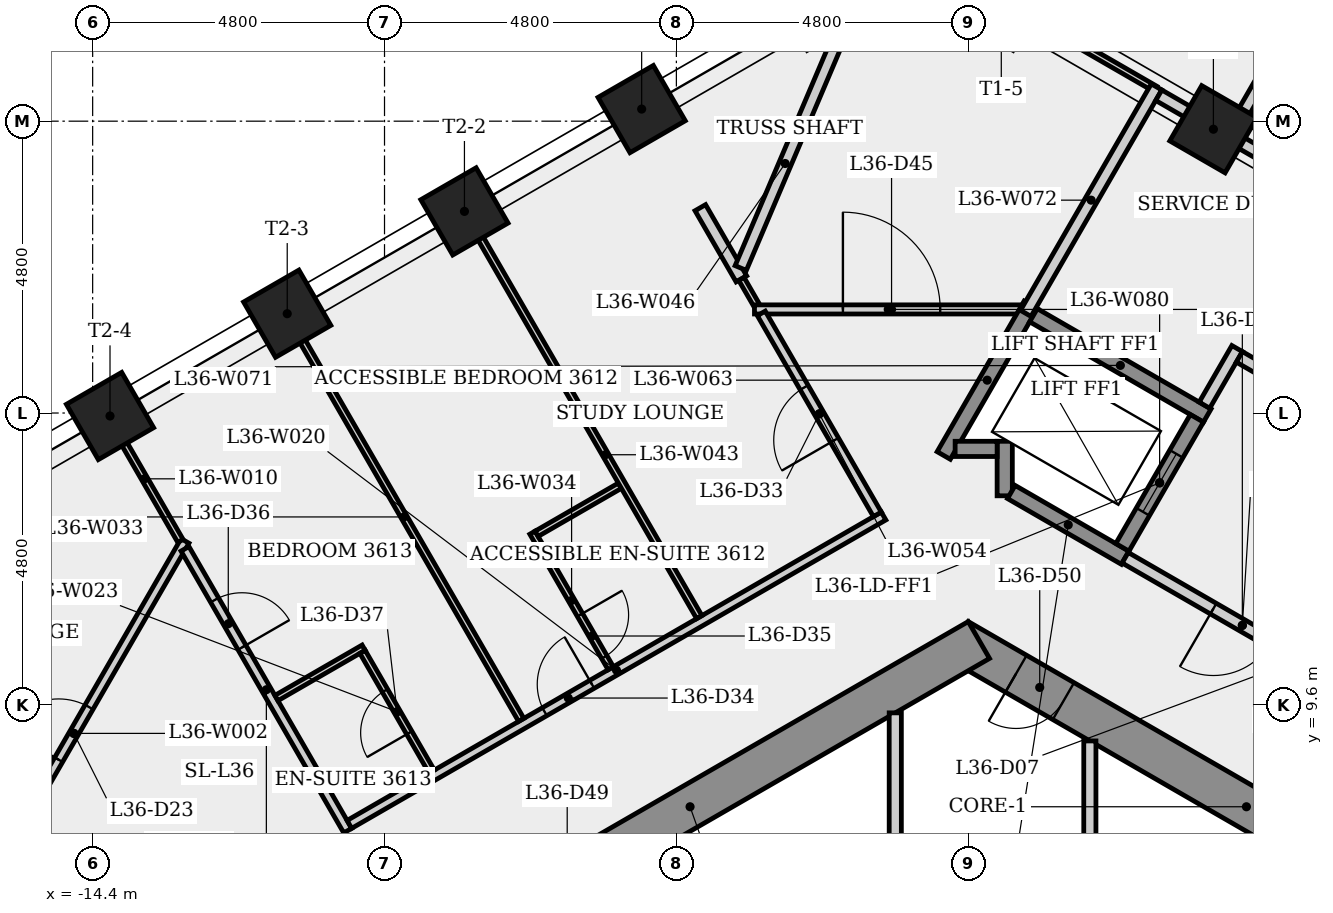
"""IFC4 building model, lengths in metres.
Left out: names, types, materials, properties, quantities, classifications, styles, units other than length and angle.
Written with IfcOpenShell. Run it as: python <this file> out.ifc"""

import sys

from ifc_helpers import new_model, si_unit, direction, frame, frame_2d, origin, origin_2d, place, context, subcontext, project, spatial, rectangle, extrude, element, fill, save


model = new_model("IFC4")
c1 = context("Model", 3, precision=1e-05, world=origin(), true_north=direction((0.0, 1.0)))
c2 = subcontext(c1, "Body", "Model", "MODEL_VIEW")
j1 = project(units=[si_unit("LENGTHUNIT", "METRE"), si_unit("PLANEANGLEUNIT", "RADIAN")], contexts=[c1])
p1 = place(None, origin())
s1 = spatial("IfcSite", under=j1, at=p1, CompositionType="ELEMENT")
p2 = place(p1, origin())
s2 = spatial("IfcBuilding", under=s1, at=p2, CompositionType="ELEMENT")
p3 = place(p2, frame((0.0, 0.0, 135.9)))
s3 = spatial("IfcBuildingStorey", under=s2, at=p3, CompositionType="ELEMENT", Elevation=135.9)
p4 = place(p3, frame((9.325, 5.182, 0.0), z_axis=(0.0, 0.0, 1.0), x_axis=(-0.866023993627, 0.500002442456, 0.0)))
e1 = element("IfcWall", 1, at=p4, inside=s3, PredefinedType="SHEAR", context=c2, shape_type="SweptSolid", body=[
    extrude(rectangle(XDim=10.97, YDim=0.7, at=frame_2d((5.485, 0.0))), origin(), (0.0, 0.0, 1.0), 4.0),
])
p5 = place(p4, frame((8.96, 0.0, 0.0)))
e2 = element("IfcOpeningElement", 2, at=p5, cuts=e1, PredefinedType="OPENING", context=c2, shape_type="SweptSolid", body=[
    extrude(rectangle(XDim=0.9, YDim=2.1, at=frame_2d((0.45, 1.05))), frame((0.0, 0.36, 0.0), z_axis=(0.0, -1.0, 0.0), x_axis=(1.0, 0.0, 0.0)), (0.0, 0.0, 1.0), 0.72),
])
p6 = place(p4, frame((2.24, 0.0, 0.0)))
e3 = element("IfcOpeningElement", 3, at=p6, cuts=e1, PredefinedType="OPENING", context=c2, shape_type="SweptSolid", body=[
    extrude(rectangle(XDim=0.9, YDim=2.1, at=frame_2d((0.45, 1.05))), frame((0.0, 0.36, 0.0), z_axis=(0.0, -1.0, 0.0), x_axis=(1.0, 0.0, 0.0)), (0.0, 0.0, 1.0), 0.72),
])
p7 = place(p3, frame((0.175, 10.667, 0.0), z_axis=(0.0, 0.0, 1.0), x_axis=(-0.866023993627, -0.500002442456, 0.0)))
e4 = element("IfcWall", 4, at=p7, inside=s3, PredefinedType="SHEAR", context=c2, shape_type="SweptSolid", body=[
    extrude(rectangle(XDim=10.97, YDim=0.7, at=frame_2d((5.485, 0.0))), origin(), (0.0, 0.0, 1.0), 4.0),
])
p8 = place(p7, frame((7.368, 0.0, 0.0)))
e5 = element("IfcOpeningElement", 5, at=p8, cuts=e4, PredefinedType="OPENING", context=c2, shape_type="SweptSolid", body=[
    extrude(rectangle(XDim=0.9, YDim=2.1, at=frame_2d((0.45, 1.05))), frame((0.0, 0.36, 0.0), z_axis=(0.0, -1.0, 0.0), x_axis=(1.0, 0.0, 0.0)), (0.0, 0.0, 1.0), 0.72),
])
for number, where, z_axis, x_axis in (
    (6, (4.032, 19.068, 0.0), (0.0, 0.0, 1.0), (0.5, 0.866, 0.0)),
    (7, (-5.371, 19.399, 0.0), (0.0, 0.0, 1.0), (-0.5, 0.866, 0.0)),
    (8, (-8.286, 17.716, 0.0), (0.0, 0.0, 1.0), (-0.5, 0.866, 0.0)),
    (9, (-11.2, 16.034, 0.0), (0.0, 0.0, 1.0), (-0.5, 0.866, 0.0)),
    (10, (-14.115, 14.351, 0.0), (0.0, 0.0, 1.0), (-0.5, 0.866, 0.0)),
):
    element("IfcColumn", number, at=place(p3, frame(where, z_axis=z_axis, x_axis=x_axis)), inside=s3, PredefinedType="COLUMN", context=c2, shape_type="SweptSolid", body=[
        extrude(rectangle(XDim=1.05, YDim=1.05, at=origin_2d()), origin(), (0.0, 0.0, 1.0), 4.0),
    ])
p9 = place(p3, frame((-16.537, 5.965, 0.0), z_axis=(0.0, 0.0, 1.0), x_axis=(0.500014413017, 0.866017082265, 0.0)))
e11 = element("IfcWall", 11, at=p9, inside=s3, PredefinedType="PARTITIONING", context=c2, shape_type="SweptSolid", body=[
    extrude(rectangle(XDim=7.311, YDim=0.15, at=frame_2d((3.655, 0.0))), origin(), (0.0, 0.0, 1.0), 3.6),
])
p10 = place(p9, frame((3.156, 0.0, 0.0)))
e12 = element("IfcOpeningElement", 12, at=p10, cuts=e11, PredefinedType="OPENING", context=c2, shape_type="SweptSolid", body=[
    extrude(rectangle(XDim=1.0, YDim=2.1, at=frame_2d((0.5, 1.05))), frame((0.0, 0.085, 0.0), z_axis=(0.0, -1.0, 0.0), x_axis=(1.0, 0.0, 0.0)), (0.0, 0.0, 1.0), 0.17),
])
p11 = place(p3, frame((-14.135, 14.339, 0.0), z_axis=(0.0, 0.0, 1.0), x_axis=(0.499991277142, -0.86603043987, 0.0)))
e13 = element("IfcWall", 13, at=p11, inside=s3, PredefinedType="PARTITIONING", context=c2, shape_type="SweptSolid", body=[
    extrude(rectangle(XDim=2.358, YDim=0.1, at=frame_2d((1.179, 0.0))), origin(), (0.0, 0.0, 1.0), 3.6),
])
p12 = place(p3, frame((-12.881, 12.167, 0.0), z_axis=(0.0, 0.0, 1.0), x_axis=(0.500034386872, -0.866005549604, 0.0)))
e14 = element("IfcWall", 14, at=p12, inside=s3, PredefinedType="PARTITIONING", context=c2, shape_type="SweptSolid", body=[
    extrude(rectangle(XDim=5.352, YDim=0.15, at=frame_2d((2.676, 0.0))), origin(), (0.0, 0.0, 1.0), 3.6),
])
p13 = place(p12, frame((0.974, 0.0, 0.0)))
e15 = element("IfcOpeningElement", 15, at=p13, cuts=e14, PredefinedType="OPENING", context=c2, shape_type="SweptSolid", body=[
    extrude(rectangle(XDim=0.9, YDim=2.1, at=frame_2d((0.45, 1.05))), frame((0.0, 0.085, 0.0), z_axis=(0.0, -1.0, 0.0), x_axis=(1.0, 0.0, 0.0)), (0.0, 0.0, 1.0), 0.17),
])
p14 = place(p3, frame((-10.178, 7.634, 0.0), z_axis=(0.0, 0.0, 1.0), x_axis=(0.866024876865, 0.500000912651, 0.0)))
e16 = element("IfcWall", 16, at=p14, inside=s3, PredefinedType="PARTITIONING", context=c2, shape_type="SweptSolid", body=[
    extrude(rectangle(XDim=10.145, YDim=0.15, at=frame_2d((5.072, 0.0))), origin(), (0.0, 0.0, 1.0), 3.6),
])
p15 = place(p14, frame((3.707, 0.0, 0.0)))
e17 = element("IfcOpeningElement", 17, at=p15, cuts=e16, PredefinedType="OPENING", context=c2, shape_type="SweptSolid", body=[
    extrude(rectangle(XDim=0.9, YDim=2.1, at=frame_2d((0.45, 1.05))), frame((0.0, 0.085, 0.0), z_axis=(0.0, -1.0, 0.0), x_axis=(1.0, 0.0, 0.0)), (0.0, 0.0, 1.0), 0.17),
])
p16 = place(p3, frame((-9.943, 10.541, 0.0), z_axis=(0.0, 0.0, 1.0), x_axis=(-0.866057962423, -0.499943602543, 0.0)))
e18 = element("IfcWall", 18, at=p16, inside=s3, PredefinedType="PARTITIONING", context=c2, shape_type="SweptSolid", body=[
    extrude(rectangle(XDim=1.656, YDim=0.1, at=frame_2d((0.828, 0.0))), origin(), (0.0, 0.0, 1.0), 3.6),
])
p17 = place(p3, frame((-8.824, 8.502, 0.0), z_axis=(0.0, 0.0, 1.0), x_axis=(-0.499982560684, 0.866035472144, 0.0)))
e19 = element("IfcWall", 19, at=p17, inside=s3, PredefinedType="PARTITIONING", context=c2, shape_type="SweptSolid", body=[
    extrude(rectangle(XDim=2.275, YDim=0.1, at=frame_2d((1.137, 0.0))), origin(), (0.0, 0.0, 1.0), 3.6),
])
p18 = place(p17, frame((0.738, 0.0, 0.0)))
e20 = element("IfcOpeningElement", 20, at=p18, cuts=e19, PredefinedType="OPENING", context=c2, shape_type="SweptSolid", body=[
    extrude(rectangle(XDim=0.8, YDim=2.1, at=frame_2d((0.4, 1.05))), frame((0.0, 0.06, 0.0), z_axis=(0.0, -1.0, 0.0), x_axis=(1.0, 0.0, 0.0)), (0.0, 0.0, 1.0), 0.12),
])
p19 = place(p3, frame((-7.352, 9.352, 0.0), z_axis=(0.0, 0.0, 1.0), x_axis=(-0.499997453958, 0.866026873738, 0.0)))
e21 = element("IfcWall", 21, at=p19, inside=s3, PredefinedType="PARTITIONING", context=c2, shape_type="SweptSolid", body=[
    extrude(rectangle(XDim=7.71, YDim=0.1, at=frame_2d((3.855, 0.0))), origin(), (0.0, 0.0, 1.0), 3.6),
])
p20 = place(p3, frame((-7.167, 12.432, 0.0), z_axis=(0.0, 0.0, 1.0), x_axis=(0.500034319456, -0.866005588531, 0.0)))
e22 = element("IfcWall", 22, at=p20, inside=s3, PredefinedType="PARTITIONING", context=c2, shape_type="SweptSolid", body=[
    extrude(rectangle(XDim=2.575, YDim=0.1, at=frame_2d((1.288, 0.0))), origin(), (0.0, 0.0, 1.0), 3.6),
])
p21 = place(p20, frame((1.562, 0.0, 0.0)))
e23 = element("IfcOpeningElement", 23, at=p21, cuts=e22, PredefinedType="OPENING", context=c2, shape_type="SweptSolid", body=[
    extrude(rectangle(XDim=0.8, YDim=2.1, at=frame_2d((0.4, 1.05))), frame((0.0, 0.06, 0.0), z_axis=(0.0, -1.0, 0.0), x_axis=(1.0, 0.0, 0.0)), (0.0, 0.0, 1.0), 0.12),
])
p22 = place(p3, frame((-5.729, 13.205, 0.0), z_axis=(0.0, 0.0, 1.0), x_axis=(-0.866021059532, -0.50000752439, 0.0)))
e24 = element("IfcWall", 24, at=p22, inside=s3, PredefinedType="PARTITIONING", context=c2, shape_type="SweptSolid", body=[
    extrude(rectangle(XDim=1.582, YDim=0.1, at=frame_2d((0.791, 0.0))), origin(), (0.0, 0.0, 1.0), 3.6),
])
p23 = place(p3, frame((-4.406, 17.777, 0.0), z_axis=(0.0, 0.0, 1.0), x_axis=(0.499868360126, -0.866101392762, 0.0)))
e25 = element("IfcWall", 25, at=p23, inside=s3, PredefinedType="PLUMBINGWALL", context=c2, shape_type="SweptSolid", body=[
    extrude(rectangle(XDim=1.352, YDim=0.2, at=frame_2d((0.676, 0.0))), origin(), (0.0, 0.0, 1.0), 3.6),
])
p24 = place(p3, frame((-4.423, 11.043, 0.0), z_axis=(0.0, 0.0, 1.0), x_axis=(-0.499983743644, 0.866034789193, 0.0)))
e26 = element("IfcWall", 26, at=p24, inside=s3, PredefinedType="PARTITIONING", context=c2, shape_type="SweptSolid", body=[
    extrude(rectangle(XDim=7.711, YDim=0.1, at=frame_2d((3.855, 0.0))), origin(), (0.0, 0.0, 1.0), 3.6),
])
p25 = place(p3, frame((-3.731, 16.606, 0.0), z_axis=(0.0, 0.0, 1.0), x_axis=(0.499931517724, -0.866064938435, 0.0)))
e27 = element("IfcWall", 27, at=p25, inside=s3, PredefinedType="PARTITIONING", context=c2, shape_type="SweptSolid", body=[
    extrude(rectangle(XDim=0.505, YDim=0.1, at=frame_2d((0.253, 0.0))), origin(), (0.0, 0.0, 1.0), 3.6),
])
p26 = place(p3, frame((-3.742, 16.785, 0.0), z_axis=(0.0, 0.0, 1.0), x_axis=(0.391305578828, 0.920260802152, 0.0)))
e28 = element("IfcWall", 28, at=p26, inside=s3, PredefinedType="PLUMBINGWALL", context=c2, shape_type="SweptSolid", body=[
    extrude(rectangle(XDim=4.67, YDim=0.2, at=frame_2d((2.335, 0.0))), origin(), (0.0, 0.0, 1.0), 3.6),
])
p27 = place(p3, frame((-3.516, 16.104, 0.0), z_axis=(0.0, 0.0, 1.0), x_axis=(1.0, 0.0, 0.0)))
e29 = element("IfcWall", 29, at=p27, inside=s3, PredefinedType="PARTITIONING", context=c2, shape_type="SweptSolid", body=[
    extrude(rectangle(XDim=4.399, YDim=0.15, at=frame_2d((2.2, 0.0))), origin(), (0.0, 0.0, 1.0), 3.6),
])
p28 = place(p27, frame((1.455, 0.0, 0.0)))
e30 = element("IfcOpeningElement", 30, at=p28, cuts=e29, PredefinedType="OPENING", context=c2, shape_type="SweptSolid", body=[
    extrude(rectangle(XDim=1.6, YDim=2.1, at=frame_2d((0.8, 1.05))), frame((0.0, 0.085, 0.0), z_axis=(0.0, -1.0, 0.0), x_axis=(1.0, 0.0, 0.0)), (0.0, 0.0, 1.0), 0.17),
])
p29 = place(p3, frame((-1.495, 12.734, 0.0), z_axis=(0.0, 0.0, 1.0), x_axis=(-0.499991942392, 0.866030055796, 0.0)))
e31 = element("IfcWall", 31, at=p29, inside=s3, PredefinedType="PARTITIONING", context=c2, shape_type="SweptSolid", body=[
    extrude(rectangle(XDim=3.816, YDim=0.15, at=frame_2d((1.908, 0.0))), origin(), (0.0, 0.0, 1.0), 3.6),
])
p30 = place(p29, frame((1.408, 0.0, 0.0)))
e32 = element("IfcOpeningElement", 32, at=p30, cuts=e31, PredefinedType="OPENING", context=c2, shape_type="SweptSolid", body=[
    extrude(rectangle(XDim=1.0, YDim=2.1, at=frame_2d((0.5, 1.05))), frame((0.0, 0.085, 0.0), z_axis=(0.0, -1.0, 0.0), x_axis=(1.0, 0.0, 0.0)), (0.0, 0.0, 1.0), 0.17),
])
p31 = place(p3, frame((-1.2, 9.469, 0.0), z_axis=(0.0, 0.0, 1.0), x_axis=(0.0, -1.0, 0.0)))
e33 = element("IfcWall", 33, at=p31, inside=s3, PredefinedType="PARTITIONING", context=c2, shape_type="SweptSolid", body=[
    extrude(rectangle(XDim=4.194, YDim=0.2, at=frame_2d((2.097, 0.0))), origin(), (0.0, 0.0, 1.0), 3.6),
])
p32 = place(p3, frame((-0.403, 13.702, 0.0), z_axis=(0.0, 0.0, 1.0), x_axis=(0.499976111731, 0.866039195244, 0.0)))
e34 = element("IfcWall", 34, at=p32, inside=s3, PredefinedType="SHEAR", context=c2, shape_type="SweptSolid", body=[
    extrude(rectangle(XDim=2.861, YDim=0.25, at=frame_2d((1.43, 0.0))), origin(), (0.0, 0.0, 1.0), 3.6),
])
p33 = place(p3, frame((0.124, 21.436, 0.0), z_axis=(0.0, 0.0, 1.0), x_axis=(0.866036589769, -0.499980624807, 0.0)))
e35 = element("IfcWall", 35, at=p33, inside=s3, PredefinedType="PARTITIONING", context=c2, shape_type="SweptSolid", body=[
    extrude(rectangle(XDim=3.411, YDim=0.1, at=frame_2d((1.706, 0.0))), origin(), (0.0, 0.0, 1.0), 2.725),
])
p34 = place(p3, frame((0.6, 13.039, 0.0), z_axis=(0.0, 0.0, 1.0), x_axis=(0.0, 1.0, 0.0)))
e36 = element("IfcWall", 36, at=p34, inside=s3, PredefinedType="SHEAR", context=c2, shape_type="SweptSolid", body=[
    extrude(rectangle(XDim=0.896, YDim=0.25, at=frame_2d((0.448, 0.0))), origin(), (0.0, 0.0, 1.0), 3.6),
])
p35 = place(p3, frame((0.475, 13.81, 0.0), z_axis=(0.0, 0.0, 1.0), x_axis=(-1.0, 0.0, 0.0)))
e37 = element("IfcWall", 37, at=p35, inside=s3, PredefinedType="SHEAR", context=c2, shape_type="SweptSolid", body=[
    extrude(rectangle(XDim=0.691, YDim=0.25, at=frame_2d((0.345, 0.0))), origin(), (0.0, 0.0, 1.0), 4.0),
])
p36 = place(p3, frame((1.073, 16.008, 0.0), z_axis=(0.0, 0.0, 1.0), x_axis=(0.866040211805, -0.499974350878, 0.0)))
e38 = element("IfcWall", 38, at=p36, inside=s3, PredefinedType="SHEAR", context=c2, shape_type="SweptSolid", body=[
    extrude(rectangle(XDim=3.3, YDim=0.25, at=frame_2d((1.65, 0.0))), origin(), (0.0, 0.0, 1.0), 3.6),
])
p37 = place(p3, frame((0.946, 16.039, 0.0), z_axis=(0.0, 0.0, 1.0), x_axis=(0.50004020135, 0.86600219228, 0.0)))
e39 = element("IfcWall", 39, at=p37, inside=s3, PredefinedType="PLUMBINGWALL", context=c2, shape_type="SweptSolid", body=[
    extrude(rectangle(XDim=4.301, YDim=0.2, at=frame_2d((2.15, 0.0))), origin(), (0.0, 0.0, 1.0), 3.6),
])
p38 = place(p3, frame((2.0, 9.007, 0.0), z_axis=(0.0, 0.0, 1.0), x_axis=(0.0, -1.0, 0.0)))
e40 = element("IfcWall", 40, at=p38, inside=s3, PredefinedType="PARTITIONING", context=c2, shape_type="SweptSolid", body=[
    extrude(rectangle(XDim=3.732, YDim=0.2, at=frame_2d((1.866, 0.0))), origin(), (0.0, 0.0, 1.0), 3.6),
])
p39 = place(p3, frame((2.581, 12.02, 0.0), z_axis=(0.0, 0.0, 1.0), x_axis=(-0.86603892542, 0.499976579108, 0.0)))
e41 = element("IfcWall", 41, at=p39, inside=s3, PredefinedType="SHEAR", context=c2, shape_type="SweptSolid", body=[
    extrude(rectangle(XDim=2.162, YDim=0.25, at=frame_2d((1.081, 0.0))), origin(), (0.0, 0.0, 1.0), 3.6),
])
p40 = place(p3, frame((2.535, 12.191, 0.0), z_axis=(0.0, 0.0, 1.0), x_axis=(0.500061746146, 0.865989751695, 0.0)))
e42 = element("IfcWall", 42, at=p40, inside=s3, PredefinedType="SHEAR", context=c2, shape_type="SweptSolid", body=[
    extrude(rectangle(XDim=2.45, YDim=0.25, at=frame_2d((1.225, 0.0))), origin(), (0.0, 0.0, 1.0), 4.0),
])
p41 = place(p40, frame((0.675, 0.0, 0.0)))
e43 = element("IfcOpeningElement", 43, at=p41, cuts=e42, PredefinedType="OPENING", context=c2, shape_type="SweptSolid", body=[
    extrude(rectangle(XDim=1.1, YDim=2.1, at=frame_2d((0.55, 1.05))), frame((0.0, 0.135, 0.0), z_axis=(0.0, -1.0, 0.0), x_axis=(1.0, 0.0, 0.0)), (0.0, 0.0, 1.0), 0.27),
])
p42 = place(p3, frame((3.133, 19.627, 0.0), z_axis=(0.0, 0.0, 1.0), x_axis=(0.866025783705, -0.499999341958, 0.0)))
e44 = element("IfcWall", 44, at=p42, inside=s3, PredefinedType="PLUMBINGWALL", context=c2, shape_type="SweptSolid", body=[
    extrude(rectangle(XDim=14.4, YDim=0.2, at=frame_2d((7.2, 0.0))), origin(), (0.0, 0.0, 1.0), 2.725),
])
p43 = place(p3, frame((3.885, 14.529, 0.0), z_axis=(0.0, 0.0, 1.0), x_axis=(0.499997628298, 0.866026773083, 0.0)))
e45 = element("IfcWall", 45, at=p43, inside=s3, PredefinedType="PLUMBINGWALL", context=c2, shape_type="SweptSolid", body=[
    extrude(rectangle(XDim=1.075, YDim=0.2, at=frame_2d((0.538, 0.0))), origin(), (0.0, 0.0, 1.0), 3.6),
])
p44 = place(p3, frame((4.352, 19.038, 0.0), z_axis=(0.0, 0.0, 1.0), x_axis=(0.500008481224, 0.866020507092, 0.0)))
e46 = element("IfcWall", 46, at=p44, inside=s3, PredefinedType="PLUMBINGWALL", context=c2, shape_type="SweptSolid", body=[
    extrude(rectangle(XDim=12.758, YDim=0.2, at=frame_2d((6.379, 0.0))), origin(), (0.0, 0.0, 1.0), 3.6),
])
p45 = place(p3, frame((4.459, 15.323, 0.0), z_axis=(0.0, 0.0, 1.0), x_axis=(0.866016039709, -0.500016218704, 0.0)))
e47 = element("IfcWall", 47, at=p45, inside=s3, PredefinedType="PLUMBINGWALL", context=c2, shape_type="SweptSolid", body=[
    extrude(rectangle(XDim=4.7, YDim=0.2, at=frame_2d((2.35, 0.0))), origin(), (0.0, 0.0, 1.0), 3.6),
])
p46 = place(p3, frame((6.435, 9.795, 0.0), z_axis=(0.0, 0.0, 1.0), x_axis=(-0.866012907634, 0.500021643343, 0.0)))
e48 = element("IfcWall", 48, at=p46, inside=s3, PredefinedType="PARTITIONING", context=c2, shape_type="SweptSolid", body=[
    extrude(rectangle(XDim=4.45, YDim=0.2, at=frame_2d((2.225, 0.0))), origin(), (0.0, 0.0, 1.0), 3.6),
])
p47 = place(p46, frame((1.675, 0.0, 0.0)))
e49 = element("IfcOpeningElement", 49, at=p47, cuts=e48, PredefinedType="OPENING", context=c2, shape_type="SweptSolid", body=[
    extrude(rectangle(XDim=1.1, YDim=2.1, at=frame_2d((0.55, 1.05))), frame((0.0, 0.11, 0.0), z_axis=(0.0, -1.0, 0.0), x_axis=(1.0, 0.0, 0.0)), (0.0, 0.0, 1.0), 0.22),
])
p48 = place(p47, origin())
e50 = element("IfcDoor", 50, at=p48, inside=s3, OperationType="SINGLE_SWING_RIGHT", PredefinedType="DOOR", context=c2, shape_type="SweptSolid", body=[
    extrude(rectangle(XDim=1.1, YDim=2.1, at=frame_2d((0.55, 1.05))), frame((0.0, 0.025, 0.0), z_axis=(0.0, -1.0, 0.0), x_axis=(1.0, 0.0, 0.0)), (0.0, 0.0, 1.0), 0.05),
])
fill(e49, e50)
p49 = place(p41, origin())
e51 = element("IfcDoor", 51, at=p49, inside=s3, OperationType="SLIDING_TO_LEFT", PredefinedType="DOOR", context=c2, shape_type="SweptSolid", body=[
    extrude(rectangle(XDim=1.1, YDim=2.1, at=frame_2d((0.55, 1.05))), frame((0.0, 0.025, 0.0), z_axis=(0.0, -1.0, 0.0), x_axis=(1.0, 0.0, 0.0)), (0.0, 0.0, 1.0), 0.05),
])
fill(e43, e51)
p50 = place(p10, origin())
e52 = element("IfcDoor", 52, at=p50, inside=s3, OperationType="SINGLE_SWING_LEFT", PredefinedType="DOOR", context=c2, shape_type="SweptSolid", body=[
    extrude(rectangle(XDim=1.0, YDim=2.1, at=frame_2d((0.5, 1.05))), frame((0.0, 0.025, 0.0), z_axis=(0.0, -1.0, 0.0), x_axis=(1.0, 0.0, 0.0)), (0.0, 0.0, 1.0), 0.05),
])
fill(e12, e52)
p51 = place(p30, origin())
e53 = element("IfcDoor", 53, at=p51, inside=s3, OperationType="SINGLE_SWING_LEFT", PredefinedType="DOOR", context=c2, shape_type="SweptSolid", body=[
    extrude(rectangle(XDim=1.0, YDim=2.1, at=frame_2d((0.5, 1.05))), frame((0.0, 0.025, 0.0), z_axis=(0.0, -1.0, 0.0), x_axis=(1.0, 0.0, 0.0)), (0.0, 0.0, 1.0), 0.05),
])
fill(e32, e53)
p52 = place(p15, origin())
e54 = element("IfcDoor", 54, at=p52, inside=s3, OperationType="SINGLE_SWING_RIGHT", PredefinedType="DOOR", context=c2, shape_type="SweptSolid", body=[
    extrude(rectangle(XDim=0.9, YDim=2.1, at=frame_2d((0.45, 1.05))), frame((0.0, 0.025, 0.0), z_axis=(0.0, -1.0, 0.0), x_axis=(1.0, 0.0, 0.0)), (0.0, 0.0, 1.0), 0.05),
])
fill(e17, e54)
p53 = place(p21, origin())
e55 = element("IfcDoor", 55, at=p53, inside=s3, OperationType="SINGLE_SWING_LEFT", PredefinedType="DOOR", context=c2, shape_type="SweptSolid", body=[
    extrude(rectangle(XDim=0.8, YDim=2.1, at=frame_2d((0.4, 1.05))), frame((0.0, 0.025, 0.0), z_axis=(0.0, -1.0, 0.0), x_axis=(1.0, 0.0, 0.0)), (0.0, 0.0, 1.0), 0.05),
])
fill(e23, e55)
p54 = place(p13, origin())
e56 = element("IfcDoor", 56, at=p54, inside=s3, OperationType="SINGLE_SWING_RIGHT", PredefinedType="DOOR", context=c2, shape_type="SweptSolid", body=[
    extrude(rectangle(XDim=0.9, YDim=2.1, at=frame_2d((0.45, 1.05))), frame((0.0, 0.025, 0.0), z_axis=(0.0, -1.0, 0.0), x_axis=(1.0, 0.0, 0.0)), (0.0, 0.0, 1.0), 0.05),
])
fill(e15, e56)
p55 = place(p18, origin())
e57 = element("IfcDoor", 57, at=p55, inside=s3, OperationType="SINGLE_SWING_LEFT", PredefinedType="DOOR", context=c2, shape_type="SweptSolid", body=[
    extrude(rectangle(XDim=0.8, YDim=2.1, at=frame_2d((0.4, 1.05))), frame((0.0, 0.025, 0.0), z_axis=(0.0, -1.0, 0.0), x_axis=(1.0, 0.0, 0.0)), (0.0, 0.0, 1.0), 0.05),
])
fill(e20, e57)
p56 = place(p28, origin())
e58 = element("IfcDoor", 58, at=p56, inside=s3, OperationType="SINGLE_SWING_LEFT", PredefinedType="DOOR", context=c2, shape_type="SweptSolid", body=[
    extrude(rectangle(XDim=1.6, YDim=2.1, at=frame_2d((0.8, 1.05))), frame((0.0, 0.025, 0.0), z_axis=(0.0, -1.0, 0.0), x_axis=(1.0, 0.0, 0.0)), (0.0, 0.0, 1.0), 0.05),
])
fill(e30, e58)
p57 = place(p5, origin())
e59 = element("IfcDoor", 59, at=p57, inside=s3, OperationType="SINGLE_SWING_RIGHT", PredefinedType="DOOR", context=c2, shape_type="SweptSolid", body=[
    extrude(rectangle(XDim=0.9, YDim=2.1, at=frame_2d((0.45, 1.05))), frame((0.0, 0.025, 0.0), z_axis=(0.0, -1.0, 0.0), x_axis=(1.0, 0.0, 0.0)), (0.0, 0.0, 1.0), 0.05),
])
fill(e2, e59)
save(model, sys.argv[1])
